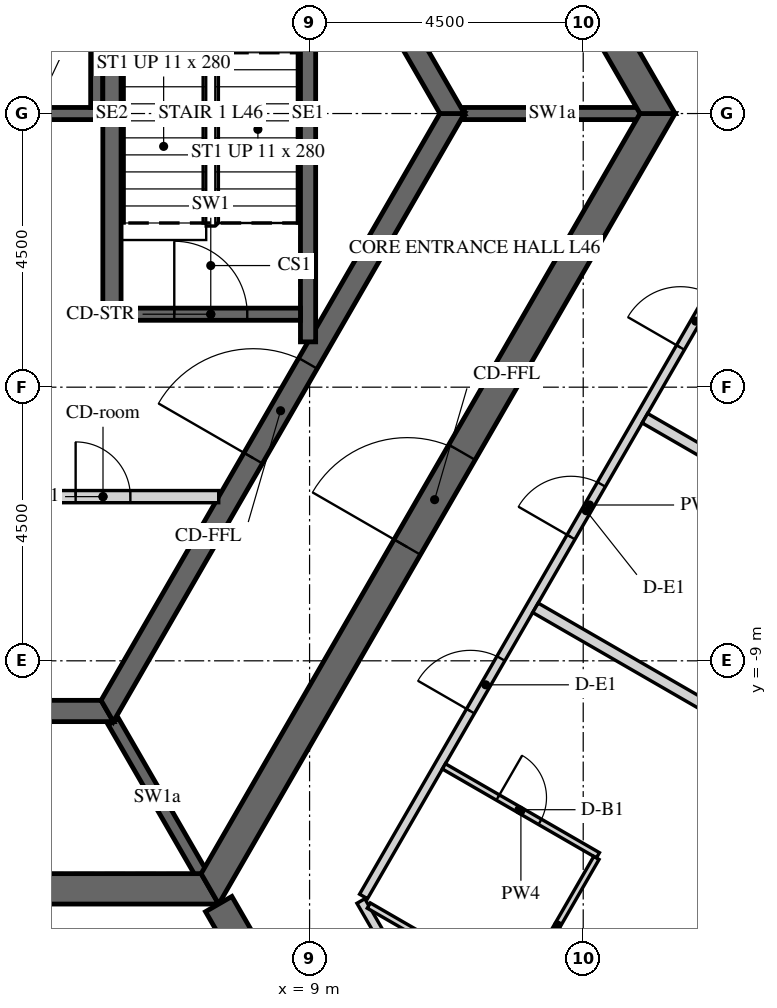
"""IFC4 building model, lengths in metres.
Left out: names, types, materials, properties, quantities, classifications, styles, units other than length and angle.
Written with IfcOpenShell. Run it as: python <this file> out.ifc"""

import sys

from ifc_helpers import new_model, si_unit, direction, frame, frame_2d, origin, place, context, subcontext, project, spatial, polyline, rectangle, outline, extrude, element, fill, save


model = new_model("IFC4")
c1 = context("Model", 3, precision=1e-05, world=origin(), true_north=direction((0.0, 1.0)))
c2 = subcontext(c1, "Body", "Model", "MODEL_VIEW")
j1 = project(units=[si_unit("LENGTHUNIT", "METRE"), si_unit("PLANEANGLEUNIT", "RADIAN")], contexts=[c1])
p1 = place(None, origin())
s1 = spatial("IfcSite", under=j1, at=p1, CompositionType="ELEMENT")
p2 = place(p1, origin())
s2 = spatial("IfcBuilding", under=s1, at=p2, CompositionType="ELEMENT")
p3 = place(p2, frame((0.0, 0.0, 195.6)))
s3 = spatial("IfcBuildingStorey", under=s2, at=p3, CompositionType="ELEMENT", Elevation=195.6)
p4 = place(p3, frame((-7.361, -12.75, -0.15), z_axis=(0.0, 0.0, 1.0), x_axis=(1.0, 0.0, 0.0)))
e1 = element("IfcWall", 1, at=p4, inside=s3, PredefinedType="SHEAR", context=c2, shape_type="SweptSolid", body=[
    extrude(outline(polyline([(-0.144, -0.25), (14.866, -0.25), (14.578, 0.25), (0.144, 0.25), (-0.144, -0.25)])), origin(), (0.0, 0.0, 1.0), 3.9),
])
p5 = place(p4, frame((6.761, 0.0, 0.15)))
e2 = element("IfcOpeningElement", 2, at=p5, cuts=e1, PredefinedType="OPENING", context=c2, shape_type="SweptSolid", body=[
    extrude(rectangle(XDim=1.2, YDim=2.4, at=frame_2d((0.6, 1.2))), frame((0.0, 0.26, 0.0), z_axis=(0.0, -1.0, 0.0), x_axis=(1.0, 0.0, 0.0)), (0.0, 0.0, 1.0), 0.52),
])
p6 = place(p3, frame((7.361, -12.75, -0.15), z_axis=(0.0, 0.0, 1.0), x_axis=(0.50000571537, 0.866022103989, 0.0)))
e3 = element("IfcWall", 3, at=p6, inside=s3, PredefinedType="SHEAR", context=c2, shape_type="SweptSolid", body=[
    extrude(outline(polyline([(-0.144, -0.25), (14.867, -0.25), (14.578, 0.25), (0.144, 0.25), (-0.144, -0.25)])), origin(), (0.0, 0.0, 1.0), 3.9),
])
p7 = place(p6, frame((6.49, 0.0, 0.15)))
e4 = element("IfcOpeningElement", 4, at=p7, cuts=e3, PredefinedType="OPENING", context=c2, shape_type="SweptSolid", body=[
    extrude(rectangle(XDim=1.8, YDim=2.4, at=frame_2d((0.9, 1.2))), frame((0.0, 0.26, 0.0), z_axis=(0.0, -1.0, 0.0), x_axis=(1.0, 0.0, 0.0)), (0.0, 0.0, 1.0), 0.52),
])
p8 = place(p3, frame((14.722, 0.0, -0.15), z_axis=(0.0, 0.0, 1.0), x_axis=(-0.50000571537, 0.866022103989, 0.0)))
e5 = element("IfcWall", 5, at=p8, inside=s3, PredefinedType="SHEAR", context=c2, shape_type="SweptSolid", body=[
    extrude(outline(polyline([(-0.144, -0.25), (14.867, -0.25), (14.578, 0.25), (0.144, 0.25), (-0.144, -0.25)])), origin(), (0.0, 0.0, 1.0), 3.9),
])
p9 = place(p8, frame((6.432, 0.0, 0.15)))
e6 = element("IfcOpeningElement", 6, at=p9, cuts=e5, PredefinedType="OPENING", context=c2, shape_type="SweptSolid", body=[
    extrude(rectangle(XDim=1.8, YDim=2.4, at=frame_2d((0.9, 1.2))), frame((0.0, 0.26, 0.0), z_axis=(0.0, -1.0, 0.0), x_axis=(1.0, 0.0, 0.0)), (0.0, 0.0, 1.0), 0.52),
])
p10 = place(p3, frame((7.506, -13.0, -0.15), z_axis=(0.0, 0.0, 1.0), x_axis=(0.499988271576, -0.866032175087, 0.0)))
e7 = element("IfcWall", 7, at=p10, inside=s3, PredefinedType="SHEAR", context=c2, shape_type="SweptSolid", body=[
    extrude(rectangle(XDim=15.424, YDim=0.5, at=frame_2d((7.712, 0.0))), origin(), (0.0, 0.0, 1.0), 3.9),
])
p11 = place(p10, frame((6.812, 0.0, 0.15)))
e8 = element("IfcOpeningElement", 8, at=p11, cuts=e7, PredefinedType="OPENING", context=c2, shape_type="SweptSolid", body=[
    extrude(rectangle(XDim=1.8, YDim=2.4, at=frame_2d((0.9, 1.2))), frame((0.0, 0.26, 0.0), z_axis=(0.0, -1.0, 0.0), x_axis=(1.0, 0.0, 0.0)), (0.0, 0.0, 1.0), 0.52),
])
p12 = place(p3, frame((-5.673, -9.825, -0.15), z_axis=(0.0, 0.0, 1.0), x_axis=(1.0, 0.0, 0.0)))
e9 = element("IfcWall", 9, at=p12, inside=s3, PredefinedType="SHEAR", context=c2, shape_type="SweptSolid", body=[
    extrude(outline(polyline([(-0.101, -0.175), (11.446, -0.175), (11.244, 0.175), (0.101, 0.175), (-0.101, -0.175)])), origin(), (0.0, 0.0, 1.0), 3.9),
])
p13 = place(p3, frame((5.673, -9.825, -0.15), z_axis=(0.0, 0.0, 1.0), x_axis=(0.499995046907, 0.866028263435, 0.0)))
e10 = element("IfcWall", 10, at=p13, inside=s3, PredefinedType="SHEAR", context=c2, shape_type="SweptSolid", body=[
    extrude(outline(polyline([(-0.101, -0.175), (11.446, -0.175), (11.244, 0.175), (0.101, 0.175), (-0.101, -0.175)])), origin(), (0.0, 0.0, 1.0), 3.9),
])
p14 = place(p13, frame((4.801, 0.0, 0.15)))
e11 = element("IfcOpeningElement", 11, at=p14, cuts=e10, PredefinedType="OPENING", context=c2, shape_type="SweptSolid", body=[
    extrude(rectangle(XDim=1.8, YDim=2.4, at=frame_2d((0.9, 1.2))), frame((0.0, 0.185, 0.0), z_axis=(0.0, -1.0, 0.0), x_axis=(1.0, 0.0, 0.0)), (0.0, 0.0, 1.0), 0.37),
])
p15 = place(p3, frame((11.345, 0.0, -0.15), z_axis=(0.0, 0.0, 1.0), x_axis=(-0.499995046907, 0.866028263435, 0.0)))
e12 = element("IfcWall", 12, at=p15, inside=s3, PredefinedType="SHEAR", context=c2, shape_type="SweptSolid", body=[
    extrude(outline(polyline([(-0.101, -0.175), (11.446, -0.175), (11.244, 0.175), (0.101, 0.175), (-0.101, -0.175)])), origin(), (0.0, 0.0, 1.0), 3.9),
])
p16 = place(p15, frame((4.744, 0.0, 0.15)))
e13 = element("IfcOpeningElement", 13, at=p16, cuts=e12, PredefinedType="OPENING", context=c2, shape_type="SweptSolid", body=[
    extrude(rectangle(XDim=1.8, YDim=2.4, at=frame_2d((0.9, 1.2))), frame((0.0, 0.185, 0.0), z_axis=(0.0, -1.0, 0.0), x_axis=(1.0, 0.0, 0.0)), (0.0, 0.0, 1.0), 0.37),
])
p17 = place(p3, frame((-5.6, 0.0, -0.25), z_axis=(0.0, 0.0, 1.0), x_axis=(1.0, 0.0, 0.0)))
e14 = element("IfcWall", 14, at=p17, inside=s3, PredefinedType="SHEAR", context=c2, shape_type="SweptSolid", body=[
    extrude(rectangle(XDim=11.2, YDim=0.2, at=frame_2d((5.6, 0.0))), origin(), (0.0, 0.0, 1.0), 3.9),
])
p18 = place(p3, frame((5.5, 0.1, -0.25), z_axis=(0.0, 0.0, 1.0), x_axis=(0.0, 1.0, 0.0)))
e15 = element("IfcWall", 15, at=p18, inside=s3, PredefinedType="SHEAR", context=c2, shape_type="SweptSolid", body=[
    extrude(rectangle(XDim=3.1, YDim=0.2, at=frame_2d((1.55, 0.0))), origin(), (0.0, 0.0, 1.0), 3.9),
])
p19 = place(p3, frame((3.7, -6.3, 0.0), z_axis=(0.0, 0.0, 1.0), x_axis=(1.0, 0.0, 0.0)))
e16 = element("IfcWall", 16, at=p19, inside=s3, PredefinedType="PARTITIONING", context=c2, shape_type="SweptSolid", body=[
    extrude(rectangle(XDim=3.806, YDim=0.2, at=frame_2d((1.903, 0.0))), origin(), (0.0, 0.0, 1.0), 3.65),
])
p20 = place(p19, frame((1.453, 0.0, 0.0)))
e17 = element("IfcOpeningElement", 17, at=p20, cuts=e16, PredefinedType="OPENING", context=c2, shape_type="SweptSolid", body=[
    extrude(rectangle(XDim=0.9, YDim=2.1, at=frame_2d((0.45, 1.05))), frame((0.0, 0.11, 0.0), z_axis=(0.0, -1.0, 0.0), x_axis=(1.0, 0.0, 0.0)), (0.0, 0.0, 1.0), 0.22),
])
for number, where, z_axis, x_axis in (
    (18, (11.547, 0.0, -0.15), (0.0, 0.0, 1.0), (1.0, 0.0, 0.0)),
    (19, (5.773, -10.0, -0.15), (0.0, 0.0, 1.0), (0.5, -0.866, 0.0)),
):
    element("IfcWall", number, at=place(p3, frame(where, z_axis=z_axis, x_axis=x_axis)), inside=s3, PredefinedType="SHEAR", context=c2, shape_type="SweptSolid", body=[
        extrude(rectangle(XDim=2.887, YDim=0.2, at=frame_2d((1.443, 0.0))), origin(), (0.0, 0.0, 1.0), 3.9),
    ])
p21 = place(p3, frame((5.75, -3.4, -0.25), z_axis=(0.0, 0.0, 1.0), x_axis=(0.0, 1.0, 0.0)))
e20 = element("IfcWall", 20, at=p21, inside=s3, PredefinedType="SHEAR", context=c2, shape_type="SweptSolid", body=[
    extrude(rectangle(XDim=6.8, YDim=0.3, at=frame_2d((3.4, 0.0))), origin(), (0.0, 0.0, 1.0), 3.9),
])
p22 = place(p3, frame((8.975, -3.755, -0.25), z_axis=(0.0, 0.0, 1.0), x_axis=(0.0, 1.0, 0.0)))
e21 = element("IfcWall", 21, at=p22, inside=s3, PredefinedType="SHEAR", context=c2, shape_type="SweptSolid", body=[
    extrude(rectangle(XDim=7.51, YDim=0.25, at=frame_2d((3.755, 0.0))), origin(), (0.0, 0.0, 1.0), 3.9),
])
p23 = place(p3, frame((5.9, -3.3, -0.25), z_axis=(0.0, 0.0, 1.0), x_axis=(1.0, 0.0, 0.0)))
e22 = element("IfcWall", 22, at=p23, inside=s3, PredefinedType="SHEAR", context=c2, shape_type="SweptSolid", body=[
    extrude(rectangle(XDim=2.95, YDim=0.2, at=frame_2d((1.475, 0.0))), origin(), (0.0, 0.0, 1.0), 3.9),
])
p24 = place(p23, frame((0.875, 0.0, 0.25)))
e23 = element("IfcOpeningElement", 23, at=p24, cuts=e22, PredefinedType="OPENING", context=c2, shape_type="SweptSolid", body=[
    extrude(rectangle(XDim=1.2, YDim=2.4, at=frame_2d((0.6, 1.2))), frame((0.0, 0.11, 0.0), z_axis=(0.0, -1.0, 0.0), x_axis=(1.0, 0.0, 0.0)), (0.0, 0.0, 1.0), 0.22),
])
p25 = place(p3, frame((13.699, -19.628, 0.0), z_axis=(0.0, 0.0, 1.0), x_axis=(-0.499993780622, 0.866028994514, 0.0)))
e24 = element("IfcWall", 24, at=p25, inside=s3, PredefinedType="PARTITIONING", context=c2, shape_type="SweptSolid", body=[
    extrude(rectangle(XDim=7.711, YDim=0.15, at=frame_2d((3.855, 0.0))), origin(), (0.0, 0.0, 1.0), 2.988),
])
p26 = place(p3, frame((9.887, -12.875, 0.0), z_axis=(0.0, 0.0, 1.0), x_axis=(0.499998228944, 0.866026426302, 0.0)))
e25 = element("IfcWall", 25, at=p26, inside=s3, PredefinedType="PARTITIONING", context=c2, shape_type="SweptSolid", body=[
    extrude(rectangle(XDim=14.867, YDim=0.15, at=frame_2d((7.433, 0.0))), origin(), (0.0, 0.0, 1.0), 2.988),
])
p27 = place(p26, frame((3.519, 0.0, 0.0)))
e26 = element("IfcOpeningElement", 26, at=p27, cuts=e25, PredefinedType="OPENING", context=c2, shape_type="SweptSolid", body=[
    extrude(rectangle(XDim=1.0, YDim=2.1, at=frame_2d((0.5, 1.05))), frame((0.0, 0.085, 0.0), z_axis=(0.0, -1.0, 0.0), x_axis=(1.0, 0.0, 0.0)), (0.0, 0.0, 1.0), 0.17),
])
p28 = place(p26, frame((6.824, 0.0, 0.0)))
e27 = element("IfcOpeningElement", 27, at=p28, cuts=e25, PredefinedType="OPENING", context=c2, shape_type="SweptSolid", body=[
    extrude(rectangle(XDim=1.0, YDim=2.1, at=frame_2d((0.5, 1.05))), frame((0.0, 0.085, 0.0), z_axis=(0.0, -1.0, 0.0), x_axis=(1.0, 0.0, 0.0)), (0.0, 0.0, 1.0), 0.17),
])
p29 = place(p26, frame((10.424, 0.0, 0.0)))
e28 = element("IfcOpeningElement", 28, at=p29, cuts=e25, PredefinedType="OPENING", context=c2, shape_type="SweptSolid", body=[
    extrude(rectangle(XDim=1.0, YDim=2.1, at=frame_2d((0.5, 1.05))), frame((0.0, 0.085, 0.0), z_axis=(0.0, -1.0, 0.0), x_axis=(1.0, 0.0, 0.0)), (0.0, 0.0, 1.0), 0.17),
])
p30 = place(p26, frame((13.667, 0.0, 0.0)))
e29 = element("IfcOpeningElement", 29, at=p30, cuts=e25, PredefinedType="OPENING", context=c2, shape_type="SweptSolid", body=[
    extrude(rectangle(XDim=1.0, YDim=2.1, at=frame_2d((0.5, 1.05))), frame((0.0, 0.085, 0.0), z_axis=(0.0, -1.0, 0.0), x_axis=(1.0, 0.0, 0.0)), (0.0, 0.0, 1.0), 0.17),
])
p31 = place(p3, frame((17.308, 0.022, 0.0), z_axis=(0.0, 0.0, 1.0), x_axis=(-0.500009245501, 0.866020065826, 0.0)))
e30 = element("IfcWall", 30, at=p31, inside=s3, PredefinedType="PARTITIONING", context=c2, shape_type="SweptSolid", body=[
    extrude(rectangle(XDim=13.976, YDim=0.15, at=frame_2d((6.988, 0.0))), origin(), (0.0, 0.0, 1.0), 2.988),
])
p32 = place(p31, frame((4.454, 0.0, 0.0)))
e31 = element("IfcOpeningElement", 31, at=p32, cuts=e30, PredefinedType="OPENING", context=c2, shape_type="SweptSolid", body=[
    extrude(rectangle(XDim=1.0, YDim=2.1, at=frame_2d((0.5, 1.05))), frame((0.0, 0.085, 0.0), z_axis=(0.0, -1.0, 0.0), x_axis=(1.0, 0.0, 0.0)), (0.0, 0.0, 1.0), 0.17),
])
p33 = place(p31, frame((8.471, 0.0, 0.0)))
e32 = element("IfcOpeningElement", 32, at=p33, cuts=e30, PredefinedType="OPENING", context=c2, shape_type="SweptSolid", body=[
    extrude(rectangle(XDim=1.0, YDim=2.1, at=frame_2d((0.5, 1.05))), frame((0.0, 0.085, 0.0), z_axis=(0.0, -1.0, 0.0), x_axis=(1.0, 0.0, 0.0)), (0.0, 0.0, 1.0), 0.17),
])
p34 = place(p3, frame((11.209, -10.736, 0.0), z_axis=(0.0, 0.0, 1.0), x_axis=(0.866046596414, -0.499963291492, 0.0)))
e33 = element("IfcWall", 33, at=p34, inside=s3, PredefinedType="PARTITIONING", context=c2, shape_type="SweptSolid", body=[
    extrude(rectangle(XDim=2.925, YDim=0.1, at=frame_2d((1.462, 0.0))), origin(), (0.0, 0.0, 1.0), 2.988),
])
p35 = place(p34, frame((1.025, 0.0, 0.0)))
e34 = element("IfcOpeningElement", 34, at=p35, cuts=e33, PredefinedType="OPENING", context=c2, shape_type="SweptSolid", body=[
    extrude(rectangle(XDim=0.8, YDim=2.1, at=frame_2d((0.4, 1.05))), frame((0.0, 0.06, 0.0), z_axis=(0.0, -1.0, 0.0), x_axis=(1.0, 0.0, 0.0)), (0.0, 0.0, 1.0), 0.12),
])
p36 = place(p3, frame((13.717, -12.242, 0.0), z_axis=(0.0, 0.0, 1.0), x_axis=(-0.499990435942, -0.866030925526, 0.0)))
e35 = element("IfcWall", 35, at=p36, inside=s3, PredefinedType="PARTITIONING", context=c2, shape_type="SweptSolid", body=[
    extrude(rectangle(XDim=2.55, YDim=0.1, at=frame_2d((1.275, 0.0))), origin(), (0.0, 0.0, 1.0), 2.988),
])
p37 = place(p3, frame((12.399, -14.425, 0.0), z_axis=(0.0, 0.0, 1.0), x_axis=(-0.866018616679, 0.500011755427, 0.0)))
e36 = element("IfcWall", 36, at=p37, inside=s3, PredefinedType="PARTITIONING", context=c2, shape_type="SweptSolid", body=[
    extrude(rectangle(XDim=2.8, YDim=0.1, at=frame_2d((1.4, 0.0))), origin(), (0.0, 0.0, 1.0), 2.988),
])
p38 = place(p3, frame((23.431, -14.316, 0.0), z_axis=(0.0, 0.0, 1.0), x_axis=(-0.866024931941, 0.500000817256, 0.0)))
e37 = element("IfcWall", 37, at=p38, inside=s3, PredefinedType="PARTITIONING", context=c2, shape_type="SweptSolid", body=[
    extrude(rectangle(XDim=12.375, YDim=0.18, at=frame_2d((6.188, 0.0))), origin(), (0.0, 0.0, 1.0), 2.988),
])
p39 = place(p3, frame((25.231, -11.198, 0.0), z_axis=(0.0, 0.0, 1.0), x_axis=(-0.866029863972, 0.499992274648, 0.0)))
e38 = element("IfcWall", 38, at=p39, inside=s3, PredefinedType="PARTITIONING", context=c2, shape_type="SweptSolid", body=[
    extrude(rectangle(XDim=12.375, YDim=0.18, at=frame_2d((6.188, 0.0))), origin(), (0.0, 0.0, 1.0), 2.988),
])
p40 = place(p7, origin())
e39 = element("IfcDoor", 39, at=p40, inside=s3, OperationType="DOUBLE_DOOR_SINGLE_SWING", PredefinedType="DOOR", context=c2, shape_type="SweptSolid", body=[
    extrude(rectangle(XDim=1.8, YDim=2.4, at=frame_2d((0.9, 1.2))), frame((0.0, 0.025, 0.0), z_axis=(0.0, -1.0, 0.0), x_axis=(1.0, 0.0, 0.0)), (0.0, 0.0, 1.0), 0.05),
])
fill(e4, e39)
p41 = place(p14, origin())
e40 = element("IfcDoor", 40, at=p41, inside=s3, OperationType="DOUBLE_DOOR_SINGLE_SWING", PredefinedType="DOOR", context=c2, shape_type="SweptSolid", body=[
    extrude(rectangle(XDim=1.8, YDim=2.4, at=frame_2d((0.9, 1.2))), frame((0.0, 0.025, 0.0), z_axis=(0.0, -1.0, 0.0), x_axis=(1.0, 0.0, 0.0)), (0.0, 0.0, 1.0), 0.05),
])
fill(e11, e40)
p42 = place(p20, origin())
e41 = element("IfcDoor", 41, at=p42, inside=s3, OperationType="SINGLE_SWING_LEFT", PredefinedType="DOOR", context=c2, shape_type="SweptSolid", body=[
    extrude(rectangle(XDim=0.9, YDim=2.1, at=frame_2d((0.45, 1.05))), frame((0.0, 0.025, 0.0), z_axis=(0.0, -1.0, 0.0), x_axis=(1.0, 0.0, 0.0)), (0.0, 0.0, 1.0), 0.05),
])
fill(e17, e41)
p43 = place(p24, origin())
e42 = element("IfcDoor", 42, at=p43, inside=s3, OperationType="SINGLE_SWING_LEFT", PredefinedType="DOOR", context=c2, shape_type="SweptSolid", body=[
    extrude(rectangle(XDim=1.2, YDim=2.4, at=frame_2d((0.6, 1.2))), frame((0.0, 0.025, 0.0), z_axis=(0.0, -1.0, 0.0), x_axis=(1.0, 0.0, 0.0)), (0.0, 0.0, 1.0), 0.05),
])
fill(e23, e42)
p44 = place(p27, origin())
e43 = element("IfcDoor", 43, at=p44, inside=s3, OperationType="SINGLE_SWING_RIGHT", PredefinedType="DOOR", context=c2, shape_type="SweptSolid", body=[
    extrude(rectangle(XDim=1.0, YDim=2.1, at=frame_2d((0.5, 1.05))), frame((0.0, 0.025, 0.0), z_axis=(0.0, -1.0, 0.0), x_axis=(1.0, 0.0, 0.0)), (0.0, 0.0, 1.0), 0.05),
])
fill(e26, e43)
p45 = place(p35, origin())
e44 = element("IfcDoor", 44, at=p45, inside=s3, OperationType="SINGLE_SWING_RIGHT", PredefinedType="DOOR", context=c2, shape_type="SweptSolid", body=[
    extrude(rectangle(XDim=0.8, YDim=2.1, at=frame_2d((0.4, 1.05))), frame((0.0, 0.025, 0.0), z_axis=(0.0, -1.0, 0.0), x_axis=(1.0, 0.0, 0.0)), (0.0, 0.0, 1.0), 0.05),
])
fill(e34, e44)
p46 = place(p28, origin())
e45 = element("IfcDoor", 45, at=p46, inside=s3, OperationType="SINGLE_SWING_RIGHT", PredefinedType="DOOR", context=c2, shape_type="SweptSolid", body=[
    extrude(rectangle(XDim=1.0, YDim=2.1, at=frame_2d((0.5, 1.05))), frame((0.0, 0.025, 0.0), z_axis=(0.0, -1.0, 0.0), x_axis=(1.0, 0.0, 0.0)), (0.0, 0.0, 1.0), 0.05),
])
fill(e27, e45)
p47 = place(p29, origin())
e46 = element("IfcDoor", 46, at=p47, inside=s3, OperationType="SINGLE_SWING_RIGHT", PredefinedType="DOOR", context=c2, shape_type="SweptSolid", body=[
    extrude(rectangle(XDim=1.0, YDim=2.1, at=frame_2d((0.5, 1.05))), frame((0.0, 0.025, 0.0), z_axis=(0.0, -1.0, 0.0), x_axis=(1.0, 0.0, 0.0)), (0.0, 0.0, 1.0), 0.05),
])
fill(e28, e46)
save(model, sys.argv[1])
